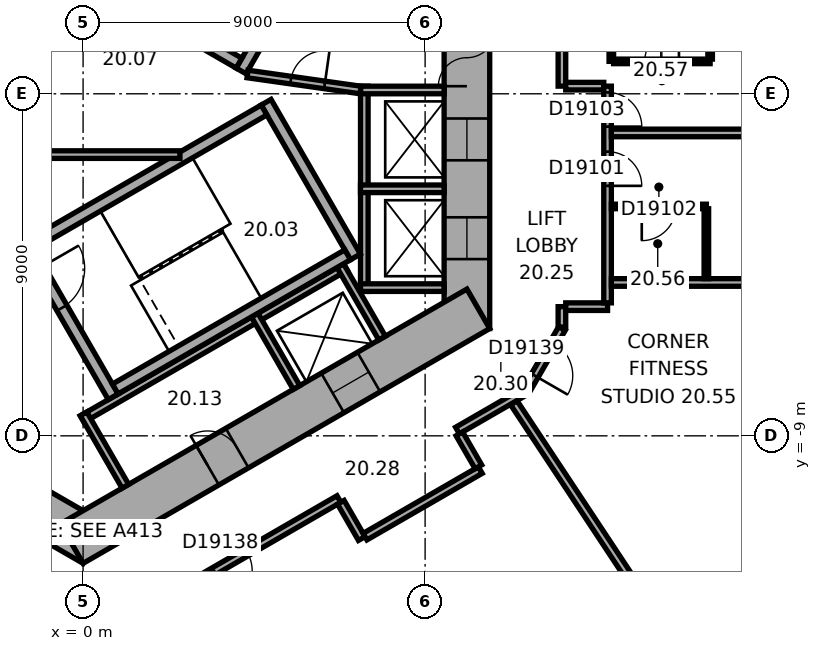
"""IFC4 building model, lengths in metres.
Left out: names, types, materials, properties, quantities, classifications, styles, units other than length and angle.
Written with IfcOpenShell. Run it as: python <this file> out.ifc"""

import sys

from ifc_helpers import new_model, si_unit, direction, frame, frame_2d, origin, place, context, subcontext, project, spatial, rectangle, extrude, element, fill, save


model = new_model("IFC4")
c1 = context("Model", 3, precision=1e-05, world=origin(), true_north=direction((0.0, 1.0)))
c2 = subcontext(c1, "Body", "Model", "MODEL_VIEW")
j1 = project(units=[si_unit("LENGTHUNIT", "METRE"), si_unit("PLANEANGLEUNIT", "RADIAN")], contexts=[c1])
p1 = place(None, origin())
s1 = spatial("IfcSite", under=j1, at=p1, CompositionType="ELEMENT")
p2 = place(p1, origin())
s2 = spatial("IfcBuilding", under=s1, at=p2, CompositionType="ELEMENT")
p3 = place(p2, frame((0.0, 0.0, 90.2)))
s3 = spatial("IfcBuildingStorey", under=s2, at=p3, CompositionType="ELEMENT", Elevation=90.2)
p4 = place(p3, frame((10.1, -6.177, 0.0), z_axis=(0.0, 0.0, 1.0), x_axis=(0.0, 1.0, 0.0)))
e1 = element("IfcWall", 1, at=p4, inside=s3, PredefinedType="SHEAR", context=c2, shape_type="SweptSolid", body=[
    extrude(rectangle(XDim=12.355, YDim=1.2, at=frame_2d((6.177, 0.0))), origin(), (0.0, 0.0, 1.0), 3.3),
])
p5 = place(p4, frame((6.378, 0.0, 0.0)))
e2 = element("IfcOpeningElement", 2, at=p5, cuts=e1, PredefinedType="OPENING", context=c2, shape_type="SweptSolid", body=[
    extrude(rectangle(XDim=1.5, YDim=2.1, at=frame_2d((0.75, 1.05))), frame((0.0, 0.61, 0.0), z_axis=(0.0, -1.0, 0.0), x_axis=(1.0, 0.0, 0.0)), (0.0, 0.0, 1.0), 1.22),
])
p6 = place(p4, frame((1.828, 0.0, 0.0)))
e3 = element("IfcOpeningElement", 3, at=p6, cuts=e1, PredefinedType="OPENING", context=c2, shape_type="SweptSolid", body=[
    extrude(rectangle(XDim=1.1, YDim=2.1, at=frame_2d((0.55, 1.05))), frame((0.0, 0.61, 0.0), z_axis=(0.0, -1.0, 0.0), x_axis=(1.0, 0.0, 0.0)), (0.0, 0.0, 1.0), 1.22),
])
p7 = place(p4, frame((4.427, 0.0, 0.0)))
e4 = element("IfcOpeningElement", 4, at=p7, cuts=e1, PredefinedType="OPENING", context=c2, shape_type="SweptSolid", body=[
    extrude(rectangle(XDim=1.1, YDim=2.1, at=frame_2d((0.55, 1.05))), frame((0.0, 0.61, 0.0), z_axis=(0.0, -1.0, 0.0), x_axis=(1.0, 0.0, 0.0)), (0.0, 0.0, 1.0), 1.22),
])
p8 = place(p3, frame((-10.4, -5.658, 0.0), z_axis=(0.0, 0.0, 1.0), x_axis=(0.866021384402, -0.500006961711, 0.0)))
e5 = element("IfcWall", 5, at=p8, inside=s3, PredefinedType="SHEAR", context=c2, shape_type="SweptSolid", body=[
    extrude(rectangle(XDim=12.355, YDim=1.2, at=frame_2d((6.178, 0.0))), origin(), (0.0, 0.0, 1.0), 3.3),
])
p9 = place(p8, frame((6.378, 0.0, 0.0)))
e6 = element("IfcOpeningElement", 6, at=p9, cuts=e5, PredefinedType="OPENING", context=c2, shape_type="SweptSolid", body=[
    extrude(rectangle(XDim=1.5, YDim=2.1, at=frame_2d((0.75, 1.05))), frame((0.0, 0.61, 0.0), z_axis=(0.0, -1.0, 0.0), x_axis=(1.0, 0.0, 0.0)), (0.0, 0.0, 1.0), 1.22),
])
p10 = place(p8, frame((3.228, 0.0, 0.0)))
e7 = element("IfcOpeningElement", 7, at=p10, cuts=e5, PredefinedType="OPENING", context=c2, shape_type="SweptSolid", body=[
    extrude(rectangle(XDim=0.9, YDim=2.1, at=frame_2d((0.45, 1.05))), frame((0.0, 0.61, 0.0), z_axis=(0.0, -1.0, 0.0), x_axis=(1.0, 0.0, 0.0)), (0.0, 0.0, 1.0), 1.22),
])
p11 = place(p3, frame((-0.3, -11.836, 0.0), z_axis=(0.0, 0.0, 1.0), x_axis=(0.866021384402, 0.500006961711, 0.0)))
e8 = element("IfcWall", 8, at=p11, inside=s3, PredefinedType="SHEAR", context=c2, shape_type="SweptSolid", body=[
    extrude(rectangle(XDim=12.355, YDim=1.2, at=frame_2d((6.178, 0.0))), origin(), (0.0, 0.0, 1.0), 3.3),
])
p12 = place(p11, frame((4.128, 0.0, 0.0)))
e9 = element("IfcOpeningElement", 9, at=p12, cuts=e8, PredefinedType="OPENING", context=c2, shape_type="SweptSolid", body=[
    extrude(rectangle(XDim=0.9, YDim=2.1, at=frame_2d((0.45, 1.05))), frame((0.0, 0.61, 0.0), z_axis=(0.0, -1.0, 0.0), x_axis=(1.0, 0.0, 0.0)), (0.0, 0.0, 1.0), 1.22),
])
p13 = place(p11, frame((7.928, 0.0, 0.0)))
e10 = element("IfcOpeningElement", 10, at=p13, cuts=e8, PredefinedType="OPENING", context=c2, shape_type="SweptSolid", body=[
    extrude(rectangle(XDim=1.1, YDim=2.1, at=frame_2d((0.55, 1.05))), frame((0.0, 0.61, 0.0), z_axis=(0.0, -1.0, 0.0), x_axis=(1.0, 0.0, 0.0)), (0.0, 0.0, 1.0), 1.22),
])
p14 = place(p3, frame((7.4, -5.2, 0.0), z_axis=(0.0, 0.0, 1.0), x_axis=(0.0, 1.0, 0.0)))
e11 = element("IfcWall", 11, at=p14, inside=s3, PredefinedType="PARTITIONING", context=c2, shape_type="SweptSolid", body=[
    extrude(rectangle(XDim=5.4, YDim=0.2, at=frame_2d((2.7, 0.0))), origin(), (0.0, 0.0, 1.0), 3.05),
])
for number, where, z_axis, x_axis in (
    (12, (7.3, -5.1, 0.0), (0.0, 0.0, 1.0), (1.0, 0.0, 0.0)),
    (13, (7.3, -2.5, 0.0), (0.0, 0.0, 1.0), (1.0, 0.0, 0.0)),
    (14, (7.3, 0.1, 0.0), (0.0, 0.0, 1.0), (1.0, 0.0, 0.0)),
):
    element("IfcWall", number, at=place(p3, frame(where, z_axis=z_axis, x_axis=x_axis)), inside=s3, PredefinedType="PARTITIONING", context=c2, shape_type="SweptSolid", body=[
        extrude(rectangle(XDim=2.2, YDim=0.2, at=frame_2d((1.1, 0.0))), origin(), (0.0, 0.0, 1.0), 3.05),
    ])
p15 = place(p3, frame((-0.024, -8.559, 0.0), z_axis=(0.0, 0.0, 1.0), x_axis=(0.866026010844, 0.49999894854, 0.0)))
e15 = element("IfcWall", 15, at=p15, inside=s3, PredefinedType="PARTITIONING", context=c2, shape_type="SweptSolid", body=[
    extrude(rectangle(XDim=8.0, YDim=0.2, at=frame_2d((4.0, 0.0))), origin(), (0.0, 0.0, 1.0), 3.05),
])
for number, where, z_axis, x_axis in (
    (16, (0.013, -8.422, 0.0), (0.0, 0.0, 1.0), (0.5, -0.866, 0.0)),
    (17, (4.516, -5.822, 0.0), (0.0, 0.0, 1.0), (0.5, -0.866, 0.0)),
    (18, (6.768, -4.522, 0.0), (0.0, 0.0, 1.0), (0.5, -0.866, 0.0)),
):
    element("IfcWall", number, at=place(p3, frame(where, z_axis=z_axis, x_axis=x_axis)), inside=s3, PredefinedType="PARTITIONING", context=c2, shape_type="SweptSolid", body=[
        extrude(rectangle(XDim=2.2, YDim=0.2, at=frame_2d((1.1, 0.0))), origin(), (0.0, 0.0, 1.0), 3.05),
    ])
p16 = place(p3, frame((4.158, 0.602, 0.0), z_axis=(0.0, 0.0, 1.0), x_axis=(0.499977259774, 0.866038532462, 0.0)))
e19 = element("IfcWall", 19, at=p16, inside=s3, PredefinedType="SHEAR", context=c2, shape_type="SweptSolid", body=[
    extrude(rectangle(XDim=4.7, YDim=0.3, at=frame_2d((2.35, 0.0))), origin(), (0.0, 0.0, 1.0), 3.05),
])
p17 = place(p16, frame((0.8, 0.0, 0.0)))
e20 = element("IfcOpeningElement", 20, at=p17, cuts=e19, PredefinedType="OPENING", context=c2, shape_type="SweptSolid", body=[
    extrude(rectangle(XDim=1.2, YDim=2.1, at=frame_2d((0.6, 1.05))), frame((0.0, 0.16, 0.0), z_axis=(0.0, -1.0, 0.0), x_axis=(1.0, 0.0, 0.0)), (0.0, 0.0, 1.0), 0.32),
])
p18 = place(p3, frame((4.103, 0.807, 0.0), z_axis=(0.0, 0.0, 1.0), x_axis=(-0.866027801685, 0.499995846692, 0.0)))
e21 = element("IfcWall", 21, at=p18, inside=s3, PredefinedType="SHEAR", context=c2, shape_type="SweptSolid", body=[
    extrude(rectangle(XDim=7.06, YDim=0.3, at=frame_2d((3.53, 0.0))), origin(), (0.0, 0.0, 1.0), 3.05),
])
p19 = place(p3, frame((-1.558, -3.902, 0.0), z_axis=(0.0, 0.0, 1.0), x_axis=(0.499977259774, -0.866038532462, 0.0)))
e22 = element("IfcWall", 22, at=p19, inside=s3, PredefinedType="SHEAR", context=c2, shape_type="SweptSolid", body=[
    extrude(rectangle(XDim=4.7, YDim=0.3, at=frame_2d((2.35, 0.0))), origin(), (0.0, 0.0, 1.0), 3.05),
])
p20 = place(p19, frame((0.8, 0.0, 0.0)))
e23 = element("IfcOpeningElement", 23, at=p20, cuts=e22, PredefinedType="OPENING", context=c2, shape_type="SweptSolid", body=[
    extrude(rectangle(XDim=1.2, YDim=2.1, at=frame_2d((0.6, 1.05))), frame((0.0, 0.16, 0.0), z_axis=(0.0, -1.0, 0.0), x_axis=(1.0, 0.0, 0.0)), (0.0, 0.0, 1.0), 0.32),
])
p21 = place(p3, frame((4.816, -0.222, 0.0), z_axis=(0.0, 0.0, 1.0), x_axis=(0.499977259774, -0.866038532462, 0.0)))
e24 = element("IfcWall", 24, at=p21, inside=s3, PredefinedType="SHEAR", context=c2, shape_type="SweptSolid", body=[
    extrude(rectangle(XDim=4.7, YDim=0.3, at=frame_2d((2.35, 0.0))), origin(), (0.0, 0.0, 1.0), 3.05),
])
for number, where, z_axis, x_axis in (
    (25, (-1.353, -3.957, 0.0), (0.0, 0.0, 1.0), (0.866, 0.5, 0.0)),
    (26, (0.847, -7.767, 0.0), (0.0, 0.0, 1.0), (0.866, 0.5, 0.0)),
):
    element("IfcWall", number, at=place(p3, frame(where, z_axis=z_axis, x_axis=x_axis)), inside=s3, PredefinedType="SHEAR", context=c2, shape_type="SweptSolid", body=[
        extrude(rectangle(XDim=7.06, YDim=0.3, at=frame_2d((3.53, 0.0))), origin(), (0.0, 0.0, 1.0), 3.05),
    ])
p22 = place(p3, frame((4.327, 0.521, 0.0), z_axis=(0.0, 0.0, 1.0), x_axis=(0.990124376366, -0.14019172346, 0.0)))
e27 = element("IfcWall", 27, at=p22, inside=s3, PredefinedType="PARTITIONING", context=c2, shape_type="SweptSolid", body=[
    extrude(rectangle(XDim=3.002, YDim=0.2, at=frame_2d((1.501, 0.0))), origin(), (0.0, 0.0, 1.0), 3.05),
])
p23 = place(p22, frame((1.15, 0.0, 0.0)))
e28 = element("IfcOpeningElement", 28, at=p23, cuts=e27, PredefinedType="OPENING", context=c2, shape_type="SweptSolid", body=[
    extrude(rectangle(XDim=0.9, YDim=2.1, at=frame_2d((0.45, 1.05))), frame((0.0, 0.11, 0.0), z_axis=(0.0, -1.0, 0.0), x_axis=(1.0, 0.0, 0.0)), (0.0, 0.0, 1.0), 0.22),
])
p24 = place(p3, frame((-2.72, -1.6, 0.0), z_axis=(0.0, 0.0, 1.0), x_axis=(1.0, 0.0, 0.0)))
e29 = element("IfcWall", 29, at=p24, inside=s3, PredefinedType="PARTITIONING", context=c2, shape_type="SweptSolid", body=[
    extrude(rectangle(XDim=5.269, YDim=0.2, at=frame_2d((2.634, 0.0))), origin(), (0.0, 0.0, 1.0), 3.05),
])
p25 = place(p3, frame((1.033, -13.953, 0.0), z_axis=(0.0, 0.0, 1.0), x_axis=(0.866017531406, 0.500013635111, 0.0)))
e30 = element("IfcWall", 30, at=p25, inside=s3, PredefinedType="PARTITIONING", context=c2, shape_type="SweptSolid", body=[
    extrude(rectangle(XDim=6.58, YDim=0.2, at=frame_2d((3.29, 0.0))), origin(), (0.0, 0.0, 1.0), 3.05),
])
p26 = place(p25, frame((2.79, 0.0, 0.0)))
e31 = element("IfcOpeningElement", 31, at=p26, cuts=e30, PredefinedType="OPENING", context=c2, shape_type="SweptSolid", body=[
    extrude(rectangle(XDim=1.0, YDim=2.1, at=frame_2d((0.5, 1.05))), frame((0.0, 0.11, 0.0), z_axis=(0.0, -1.0, 0.0), x_axis=(1.0, 0.0, 0.0)), (0.0, 0.0, 1.0), 0.22),
])
p27 = place(p3, frame((6.782, -10.749, 0.0), z_axis=(0.0, 0.0, 1.0), x_axis=(0.500074377092, -0.865982457891, 0.0)))
e32 = element("IfcWall", 32, at=p27, inside=s3, PredefinedType="PARTITIONING", context=c2, shape_type="SweptSolid", body=[
    extrude(rectangle(XDim=1.101, YDim=0.2, at=frame_2d((0.55, 0.0))), origin(), (0.0, 0.0, 1.0), 3.05),
])
p28 = place(p3, frame((7.419, -11.653, 0.0), z_axis=(0.0, 0.0, 1.0), x_axis=(0.866038154057, 0.49997791523, 0.0)))
e33 = element("IfcWall", 33, at=p28, inside=s3, PredefinedType="PARTITIONING", context=c2, shape_type="SweptSolid", body=[
    extrude(rectangle(XDim=3.502, YDim=0.2, at=frame_2d((1.751, 0.0))), origin(), (0.0, 0.0, 1.0), 3.05),
])
p29 = place(p3, frame((9.852, -8.861, 0.0), z_axis=(0.0, 0.0, 1.0), x_axis=(0.866013291437, 0.500020978615, 0.0)))
e34 = element("IfcWall", 34, at=p29, inside=s3, PredefinedType="PARTITIONING", context=c2, shape_type="SweptSolid", body=[
    extrude(rectangle(XDim=2.077, YDim=0.2, at=frame_2d((1.038, 0.0))), origin(), (0.0, 0.0, 1.0), 3.05),
])
p30 = place(p3, frame((10.402, -9.815, 0.0), z_axis=(0.0, 0.0, 1.0), x_axis=(-0.499968756647, 0.866043441391, 0.0)))
e35 = element("IfcWall", 35, at=p30, inside=s3, PredefinedType="PARTITIONING", context=c2, shape_type="SweptSolid", body=[
    extrude(rectangle(XDim=1.001, YDim=0.2, at=frame_2d((0.5, 0.0))), origin(), (0.0, 0.0, 1.0), 3.05),
])
p31 = place(p3, frame((11.67, -7.788, 0.0), z_axis=(0.0, 0.0, 1.0), x_axis=(0.500063286585, 0.865988862174, 0.0)))
e36 = element("IfcWall", 36, at=p31, inside=s3, PredefinedType="PARTITIONING", context=c2, shape_type="SweptSolid", body=[
    extrude(rectangle(XDim=1.86, YDim=0.2, at=frame_2d((0.93, 0.0))), origin(), (0.0, 0.0, 1.0), 3.05),
])
p32 = place(p31, frame((0.43, 0.0, 0.0)))
e37 = element("IfcOpeningElement", 37, at=p32, cuts=e36, PredefinedType="OPENING", context=c2, shape_type="SweptSolid", body=[
    extrude(rectangle(XDim=1.0, YDim=2.1, at=frame_2d((0.5, 1.05))), frame((0.0, 0.11, 0.0), z_axis=(0.0, -1.0, 0.0), x_axis=(1.0, 0.0, 0.0)), (0.0, 0.0, 1.0), 0.22),
])
p33 = place(p3, frame((12.6, -6.138, 0.0), z_axis=(0.0, 0.0, 1.0), x_axis=(0.0, 1.0, 0.0)))
e38 = element("IfcWall", 38, at=p33, inside=s3, PredefinedType="PARTITIONING", context=c2, shape_type="SweptSolid", body=[
    extrude(rectangle(XDim=0.537, YDim=0.2, at=frame_2d((0.268, 0.0))), origin(), (0.0, 0.0, 1.0), 3.05),
])
p34 = place(p3, frame((12.6, 0.201, 0.0), z_axis=(0.0, 0.0, 1.0), x_axis=(0.0, 1.0, 0.0)))
e39 = element("IfcWall", 39, at=p34, inside=s3, PredefinedType="PARTITIONING", context=c2, shape_type="SweptSolid", body=[
    extrude(rectangle(XDim=2.604, YDim=0.2, at=frame_2d((1.302, 0.0))), origin(), (0.0, 0.0, 1.0), 3.05),
])
p35 = place(p3, frame((12.7, -5.601, 0.0), z_axis=(0.0, 0.0, 1.0), x_axis=(1.0, 0.0, 0.0)))
e40 = element("IfcWall", 40, at=p35, inside=s3, PredefinedType="PARTITIONING", context=c2, shape_type="SweptSolid", body=[
    extrude(rectangle(XDim=1.101, YDim=0.2, at=frame_2d((0.551, 0.0))), origin(), (0.0, 0.0, 1.0), 3.05),
])
p36 = place(p3, frame((13.701, 0.201, 0.0), z_axis=(0.0, 0.0, 1.0), x_axis=(-1.0, 0.0, 0.0)))
e41 = element("IfcWall", 41, at=p36, inside=s3, PredefinedType="PARTITIONING", context=c2, shape_type="SweptSolid", body=[
    extrude(rectangle(XDim=1.001, YDim=0.2, at=frame_2d((0.5, 0.0))), origin(), (0.0, 0.0, 1.0), 3.05),
])
p37 = place(p3, frame((13.801, -5.501, 0.0), z_axis=(0.0, 0.0, 1.0), x_axis=(0.0, 1.0, 0.0)))
e42 = element("IfcWall", 42, at=p37, inside=s3, PredefinedType="PARTITIONING", context=c2, shape_type="SweptSolid", body=[
    extrude(rectangle(XDim=5.702, YDim=0.2, at=frame_2d((2.851, 0.0))), origin(), (0.0, 0.0, 1.0), 3.05),
])
p38 = place(p37, frame((3.079, 0.0, 0.0)))
e43 = element("IfcOpeningElement", 43, at=p38, cuts=e42, PredefinedType="OPENING", context=c2, shape_type="SweptSolid", body=[
    extrude(rectangle(XDim=0.9, YDim=2.1, at=frame_2d((0.45, 1.05))), frame((0.0, 0.11, 0.0), z_axis=(0.0, -1.0, 0.0), x_axis=(1.0, 0.0, 0.0)), (0.0, 0.0, 1.0), 0.22),
])
p39 = place(p37, frame((4.636, 0.0, 0.0)))
e44 = element("IfcOpeningElement", 44, at=p39, cuts=e42, PredefinedType="OPENING", context=c2, shape_type="SweptSolid", body=[
    extrude(rectangle(XDim=0.9, YDim=2.1, at=frame_2d((0.45, 1.05))), frame((0.0, 0.11, 0.0), z_axis=(0.0, -1.0, 0.0), x_axis=(1.0, 0.0, 0.0)), (0.0, 0.0, 1.0), 0.22),
])
p40 = place(p3, frame((13.901, -4.965, 0.0), z_axis=(0.0, 0.0, 1.0), x_axis=(1.0, 0.0, 0.0)))
e45 = element("IfcWall", 45, at=p40, inside=s3, PredefinedType="PARTITIONING", context=c2, shape_type="SweptSolid", body=[
    extrude(rectangle(XDim=8.049, YDim=0.2, at=frame_2d((4.024, 0.0))), origin(), (0.0, 0.0, 1.0), 3.05),
])
p41 = place(p3, frame((13.901, -2.965, 0.0), z_axis=(0.0, 0.0, 1.0), x_axis=(1.0, 0.0, 0.0)))
e46 = element("IfcWall", 46, at=p41, inside=s3, PredefinedType="PARTITIONING", context=c2, shape_type="SweptSolid", body=[
    extrude(rectangle(XDim=2.5, YDim=0.12, at=frame_2d((1.25, 0.0))), origin(), (0.0, 0.0, 1.0), 3.05),
])
p42 = place(p41, frame((0.8, 0.0, 0.0)))
e47 = element("IfcOpeningElement", 47, at=p42, cuts=e46, PredefinedType="OPENING", context=c2, shape_type="SweptSolid", body=[
    extrude(rectangle(XDim=0.9, YDim=2.1, at=frame_2d((0.45, 1.05))), frame((0.0, 0.07, 0.0), z_axis=(0.0, -1.0, 0.0), x_axis=(1.0, 0.0, 0.0)), (0.0, 0.0, 1.0), 0.14),
])
p43 = place(p3, frame((13.9, 0.853, 0.0), z_axis=(0.0, 0.0, 1.0), x_axis=(0.0, 1.0, 0.0)))
e48 = element("IfcWall", 48, at=p43, inside=s3, PredefinedType="PARTITIONING", context=c2, shape_type="SweptSolid", body=[
    extrude(rectangle(XDim=1.4, YDim=0.12, at=frame_2d((0.7, 0.0))), origin(), (0.0, 0.0, 1.0), 3.05),
])
p44 = place(p3, frame((16.255, -15.564, 0.0), z_axis=(0.0, 0.0, 1.0), x_axis=(-0.55192208744, 0.833895682562, 0.0)))
e49 = element("IfcWall", 49, at=p44, inside=s3, PredefinedType="PARTITIONING", context=c2, shape_type="SweptSolid", body=[
    extrude(rectangle(XDim=8.913, YDim=0.2, at=frame_2d((4.457, 0.0))), origin(), (0.0, 0.0, 1.0), 2.6),
])
p45 = place(p3, frame((16.401, -3.025, 0.0), z_axis=(0.0, 0.0, 1.0), x_axis=(0.0, -1.0, 0.0)))
e50 = element("IfcWall", 50, at=p45, inside=s3, PredefinedType="PARTITIONING", context=c2, shape_type="SweptSolid", body=[
    extrude(rectangle(XDim=1.84, YDim=0.12, at=frame_2d((0.92, 0.0))), origin(), (0.0, 0.0, 1.0), 3.05),
])
p46 = place(p3, frame((16.5, 0.853, 0.0), z_axis=(0.0, 0.0, 1.0), x_axis=(-1.0, 0.0, 0.0)))
e51 = element("IfcWall", 51, at=p46, inside=s3, PredefinedType="PARTITIONING", context=c2, shape_type="SweptSolid", body=[
    extrude(rectangle(XDim=2.54, YDim=0.12, at=frame_2d((1.27, 0.0))), origin(), (0.0, 0.0, 1.0), 3.05),
])
p47 = place(p46, frame((0.82, 0.0, 0.0)))
e52 = element("IfcOpeningElement", 52, at=p47, cuts=e51, PredefinedType="OPENING", context=c2, shape_type="SweptSolid", body=[
    extrude(rectangle(XDim=0.9, YDim=2.1, at=frame_2d((0.45, 1.05))), frame((0.0, 0.07, 0.0), z_axis=(0.0, -1.0, 0.0), x_axis=(1.0, 0.0, 0.0)), (0.0, 0.0, 1.0), 0.14),
])
p48 = place(p3, frame((16.5, 2.193, 0.0), z_axis=(0.0, 0.0, 1.0), x_axis=(0.0, -1.0, 0.0)))
e53 = element("IfcWall", 53, at=p48, inside=s3, PredefinedType="PARTITIONING", context=c2, shape_type="SweptSolid", body=[
    extrude(rectangle(XDim=1.28, YDim=0.12, at=frame_2d((0.64, 0.0))), origin(), (0.0, 0.0, 1.0), 3.05),
])
p49 = place(p3, frame((21.95, -1.03, 0.0), z_axis=(0.0, 0.0, 1.0), x_axis=(-1.0, 0.0, 0.0)))
e54 = element("IfcWall", 54, at=p49, inside=s3, PredefinedType="PARTITIONING", context=c2, shape_type="SweptSolid", body=[
    extrude(rectangle(XDim=8.049, YDim=0.2, at=frame_2d((4.024, 0.0))), origin(), (0.0, 0.0, 1.0), 2.6),
])
p50 = place(p5, origin())
e55 = element("IfcDoor", 55, at=p50, inside=s3, OperationType="DOUBLE_DOOR_SINGLE_SWING", PredefinedType="DOOR", context=c2, shape_type="SweptSolid", body=[
    extrude(rectangle(XDim=1.5, YDim=2.1, at=frame_2d((0.75, 1.05))), frame((0.0, 0.025, 0.0), z_axis=(0.0, -1.0, 0.0), x_axis=(1.0, 0.0, 0.0)), (0.0, 0.0, 1.0), 0.05),
])
fill(e2, e55)
p51 = place(p20, origin())
e56 = element("IfcDoor", 56, at=p51, inside=s3, OperationType="SINGLE_SWING_RIGHT", PredefinedType="DOOR", context=c2, shape_type="SweptSolid", body=[
    extrude(rectangle(XDim=1.2, YDim=2.1, at=frame_2d((0.6, 1.05))), frame((0.0, 0.025, 0.0), z_axis=(0.0, -1.0, 0.0), x_axis=(1.0, 0.0, 0.0)), (0.0, 0.0, 1.0), 0.05),
])
fill(e23, e56)
p52 = place(p23, origin())
e57 = element("IfcDoor", 57, at=p52, inside=s3, OperationType="SINGLE_SWING_LEFT", PredefinedType="DOOR", context=c2, shape_type="SweptSolid", body=[
    extrude(rectangle(XDim=0.9, YDim=2.1, at=frame_2d((0.45, 1.05))), frame((0.0, 0.025, 0.0), z_axis=(0.0, -1.0, 0.0), x_axis=(1.0, 0.0, 0.0)), (0.0, 0.0, 1.0), 0.05),
])
fill(e28, e57)
p53 = place(p12, origin())
e58 = element("IfcDoor", 58, at=p53, inside=s3, OperationType="SINGLE_SWING_LEFT", PredefinedType="DOOR", context=c2, shape_type="SweptSolid", body=[
    extrude(rectangle(XDim=0.9, YDim=2.1, at=frame_2d((0.45, 1.05))), frame((0.0, 0.025, 0.0), z_axis=(0.0, -1.0, 0.0), x_axis=(1.0, 0.0, 0.0)), (0.0, 0.0, 1.0), 0.05),
])
fill(e9, e58)
p54 = place(p6, origin())
e59 = element("IfcDoor", 59, at=p54, inside=s3, OperationType="DOUBLE_DOOR_SLIDING", PredefinedType="DOOR", context=c2, shape_type="SweptSolid", body=[
    extrude(rectangle(XDim=1.1, YDim=2.1, at=frame_2d((0.55, 1.05))), frame((0.0, 0.025, 0.0), z_axis=(0.0, -1.0, 0.0), x_axis=(1.0, 0.0, 0.0)), (0.0, 0.0, 1.0), 0.05),
])
fill(e3, e59)
p55 = place(p7, origin())
e60 = element("IfcDoor", 60, at=p55, inside=s3, OperationType="DOUBLE_DOOR_SLIDING", PredefinedType="DOOR", context=c2, shape_type="SweptSolid", body=[
    extrude(rectangle(XDim=1.1, YDim=2.1, at=frame_2d((0.55, 1.05))), frame((0.0, 0.025, 0.0), z_axis=(0.0, -1.0, 0.0), x_axis=(1.0, 0.0, 0.0)), (0.0, 0.0, 1.0), 0.05),
])
fill(e4, e60)
p56 = place(p13, origin())
e61 = element("IfcDoor", 61, at=p56, inside=s3, OperationType="DOUBLE_DOOR_SLIDING", PredefinedType="DOOR", context=c2, shape_type="SweptSolid", body=[
    extrude(rectangle(XDim=1.1, YDim=2.1, at=frame_2d((0.55, 1.05))), frame((0.0, 0.025, 0.0), z_axis=(0.0, -1.0, 0.0), x_axis=(1.0, 0.0, 0.0)), (0.0, 0.0, 1.0), 0.05),
])
fill(e10, e61)
p57 = place(p38, origin())
e62 = element("IfcDoor", 62, at=p57, inside=s3, OperationType="SINGLE_SWING_LEFT", PredefinedType="DOOR", context=c2, shape_type="SweptSolid", body=[
    extrude(rectangle(XDim=0.9, YDim=2.1, at=frame_2d((0.45, 1.05))), frame((0.0, 0.025, 0.0), z_axis=(0.0, -1.0, 0.0), x_axis=(1.0, 0.0, 0.0)), (0.0, 0.0, 1.0), 0.05),
])
fill(e43, e62)
p58 = place(p42, origin())
e63 = element("IfcDoor", 63, at=p58, inside=s3, OperationType="SINGLE_SWING_LEFT", PredefinedType="DOOR", context=c2, shape_type="SweptSolid", body=[
    extrude(rectangle(XDim=0.9, YDim=2.1, at=frame_2d((0.45, 1.05))), frame((0.0, 0.025, 0.0), z_axis=(0.0, -1.0, 0.0), x_axis=(1.0, 0.0, 0.0)), (0.0, 0.0, 1.0), 0.05),
])
fill(e47, e63)
p59 = place(p39, origin())
e64 = element("IfcDoor", 64, at=p59, inside=s3, OperationType="SINGLE_SWING_LEFT", PredefinedType="DOOR", context=c2, shape_type="SweptSolid", body=[
    extrude(rectangle(XDim=0.9, YDim=2.1, at=frame_2d((0.45, 1.05))), frame((0.0, 0.025, 0.0), z_axis=(0.0, -1.0, 0.0), x_axis=(1.0, 0.0, 0.0)), (0.0, 0.0, 1.0), 0.05),
])
fill(e44, e64)
p60 = place(p47, origin())
e65 = element("IfcDoor", 65, at=p60, inside=s3, OperationType="SINGLE_SWING_LEFT", PredefinedType="DOOR", context=c2, shape_type="SweptSolid", body=[
    extrude(rectangle(XDim=0.9, YDim=2.1, at=frame_2d((0.45, 1.05))), frame((0.0, 0.025, 0.0), z_axis=(0.0, -1.0, 0.0), x_axis=(1.0, 0.0, 0.0)), (0.0, 0.0, 1.0), 0.05),
])
fill(e52, e65)
p61 = place(p26, origin())
e66 = element("IfcDoor", 66, at=p61, inside=s3, OperationType="SINGLE_SWING_LEFT", PredefinedType="DOOR", context=c2, shape_type="SweptSolid", body=[
    extrude(rectangle(XDim=1.0, YDim=2.1, at=frame_2d((0.5, 1.05))), frame((0.0, 0.025, 0.0), z_axis=(0.0, -1.0, 0.0), x_axis=(1.0, 0.0, 0.0)), (0.0, 0.0, 1.0), 0.05),
])
fill(e31, e66)
p62 = place(p32, origin())
e67 = element("IfcDoor", 67, at=p62, inside=s3, OperationType="SINGLE_SWING_LEFT", PredefinedType="DOOR", context=c2, shape_type="SweptSolid", body=[
    extrude(rectangle(XDim=1.0, YDim=2.1, at=frame_2d((0.5, 1.05))), frame((0.0, 0.025, 0.0), z_axis=(0.0, -1.0, 0.0), x_axis=(1.0, 0.0, 0.0)), (0.0, 0.0, 1.0), 0.05),
])
fill(e37, e67)
save(model, sys.argv[1])
